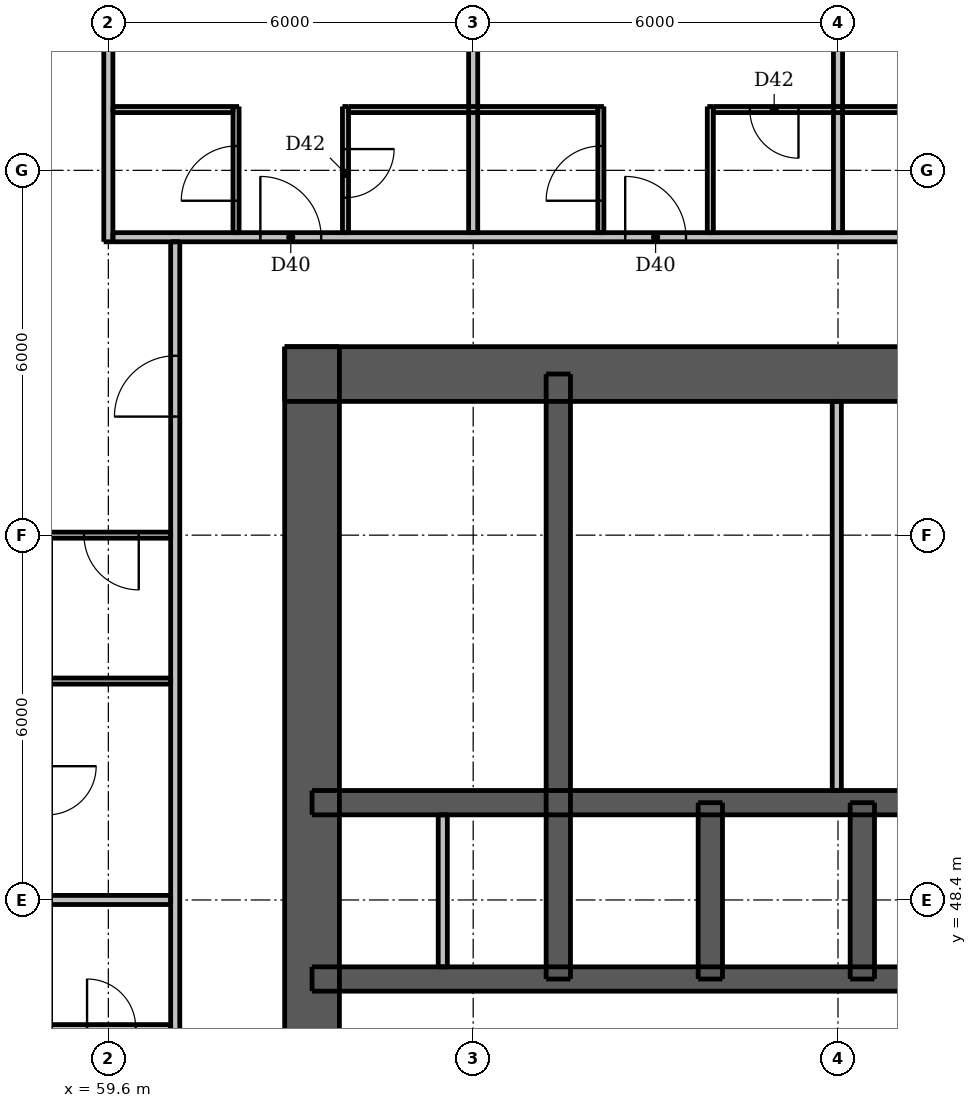
"""IFC4 building model, lengths in metres.
Left out: names, types, materials, properties, quantities, classifications, styles, units other than length and angle.
Written with IfcOpenShell. Run it as: python <this file> out.ifc"""

import sys

from ifc_helpers import new_model, si_unit, direction, frame, frame_2d, origin, place, context, subcontext, project, spatial, rectangle, extrude, element, fill, save


model = new_model("IFC4")
c1 = context("Model", 3, precision=1e-05, world=origin(), true_north=direction((0.0, 1.0)))
c2 = subcontext(c1, "Body", "Model", "MODEL_VIEW")
j1 = project(units=[si_unit("LENGTHUNIT", "METRE"), si_unit("PLANEANGLEUNIT", "RADIAN")], contexts=[c1])
p1 = place(None, origin())
s1 = spatial("IfcSite", under=j1, at=p1, CompositionType="ELEMENT")
p2 = place(p1, origin())
s2 = spatial("IfcBuilding", under=s1, at=p2, CompositionType="ELEMENT")
p3 = place(p2, frame((0.0, 0.0, 26.8)))
s3 = spatial("IfcBuildingStorey", under=s2, at=p3, CompositionType="ELEMENT", Elevation=26.8)
p4 = place(p3, frame((62.5, 57.05, 0.0), z_axis=(0.0, 0.0, 1.0), x_axis=(1.0, 0.0, 0.0)))
e1 = element("IfcWall", 1, at=p4, inside=s3, PredefinedType="SHEAR", context=c2, shape_type="SweptSolid", body=[
    extrude(rectangle(XDim=24.0, YDim=0.9, at=frame_2d((12.0, 0.0))), origin(), (0.0, 0.0, 1.0), 3.05),
])
p5 = place(p4, frame((20.85, 0.0, 0.0)))
e2 = element("IfcOpeningElement", 2, at=p5, cuts=e1, PredefinedType="OPENING", context=c2, shape_type="SweptSolid", body=[
    extrude(rectangle(XDim=1.1, YDim=2.1, at=frame_2d((0.55, 1.05))), frame((0.0, 0.46, 0.0), z_axis=(0.0, -1.0, 0.0), x_axis=(1.0, 0.0, 0.0)), (0.0, 0.0, 1.0), 0.92),
])
p6 = place(p4, frame((2.05, 0.0, 0.0)))
e3 = element("IfcOpeningElement", 3, at=p6, cuts=e1, PredefinedType="OPENING", context=c2, shape_type="SweptSolid", body=[
    extrude(rectangle(XDim=1.1, YDim=2.1, at=frame_2d((0.55, 1.05))), frame((0.0, 0.46, 0.0), z_axis=(0.0, -1.0, 0.0), x_axis=(1.0, 0.0, 0.0)), (0.0, 0.0, 1.0), 0.92),
])
p7 = place(p4, frame((6.44, 0.0, 0.0)))
e4 = element("IfcOpeningElement", 4, at=p7, cuts=e1, PredefinedType="OPENING", context=c2, shape_type="SweptSolid", body=[
    extrude(rectangle(XDim=0.9, YDim=2.1, at=frame_2d((0.45, 1.05))), frame((0.0, 0.46, 0.0), z_axis=(0.0, -1.0, 0.0), x_axis=(1.0, 0.0, 0.0)), (0.0, 0.0, 1.0), 0.92),
])
p8 = place(p4, frame((13.74, 0.0, 0.0)))
e5 = element("IfcOpeningElement", 5, at=p8, cuts=e1, PredefinedType="OPENING", context=c2, shape_type="SweptSolid", body=[
    extrude(rectangle(XDim=0.9, YDim=2.1, at=frame_2d((0.45, 1.05))), frame((0.0, 0.46, 0.0), z_axis=(0.0, -1.0, 0.0), x_axis=(1.0, 0.0, 0.0)), (0.0, 0.0, 1.0), 0.92),
])
p9 = place(p3, frame((62.95, 33.5, 0.0), z_axis=(0.0, 0.0, 1.0), x_axis=(0.0, 1.0, 0.0)))
e6 = element("IfcWall", 6, at=p9, inside=s3, PredefinedType="SHEAR", context=c2, shape_type="SweptSolid", body=[
    extrude(rectangle(XDim=24.0, YDim=0.9, at=frame_2d((12.0, 0.0))), origin(), (0.0, 0.0, 1.0), 3.05),
])
p10 = place(p9, frame((11.2, 0.0, 0.0)))
e7 = element("IfcOpeningElement", 7, at=p10, cuts=e6, PredefinedType="OPENING", context=c2, shape_type="SweptSolid", body=[
    extrude(rectangle(XDim=1.6, YDim=2.1, at=frame_2d((0.8, 1.05))), frame((0.0, 0.46, 0.0), z_axis=(0.0, -1.0, 0.0), x_axis=(1.0, 0.0, 0.0)), (0.0, 0.0, 1.0), 0.92),
])
p11 = place(p3, frame((62.95, 47.1, 0.0), z_axis=(0.0, 0.0, 1.0), x_axis=(1.0, 0.0, 0.0)))
e8 = element("IfcWall", 8, at=p11, inside=s3, PredefinedType="SHEAR", context=c2, shape_type="SweptSolid", body=[
    extrude(rectangle(XDim=23.1, YDim=0.4, at=frame_2d((11.55, 0.0))), origin(), (0.0, 0.0, 1.0), 3.05),
])
p12 = place(p11, frame((0.85, 0.0, 0.0)))
e9 = element("IfcOpeningElement", 9, at=p12, cuts=e8, PredefinedType="OPENING", context=c2, shape_type="SweptSolid", body=[
    extrude(rectangle(XDim=0.9, YDim=2.1, at=frame_2d((0.45, 1.05))), frame((0.0, 0.21, 0.0), z_axis=(0.0, -1.0, 0.0), x_axis=(1.0, 0.0, 0.0)), (0.0, 0.0, 1.0), 0.42),
])
p13 = place(p11, frame((2.55, 0.0, 0.0)))
e10 = element("IfcOpeningElement", 10, at=p13, cuts=e8, PredefinedType="OPENING", context=c2, shape_type="SweptSolid", body=[
    extrude(rectangle(XDim=0.9, YDim=2.1, at=frame_2d((0.45, 1.05))), frame((0.0, 0.21, 0.0), z_axis=(0.0, -1.0, 0.0), x_axis=(1.0, 0.0, 0.0)), (0.0, 0.0, 1.0), 0.42),
])
p14 = place(p11, frame((20.5, 0.0, 0.0)))
e11 = element("IfcOpeningElement", 11, at=p14, cuts=e8, PredefinedType="OPENING", context=c2, shape_type="SweptSolid", body=[
    extrude(rectangle(XDim=0.9, YDim=2.1, at=frame_2d((0.45, 1.05))), frame((0.0, 0.21, 0.0), z_axis=(0.0, -1.0, 0.0), x_axis=(1.0, 0.0, 0.0)), (0.0, 0.0, 1.0), 0.42),
])
p15 = place(p3, frame((62.95, 50.0, 0.0), z_axis=(0.0, 0.0, 1.0), x_axis=(1.0, 0.0, 0.0)))
e12 = element("IfcWall", 12, at=p15, inside=s3, PredefinedType="SHEAR", context=c2, shape_type="SweptSolid", body=[
    extrude(rectangle(XDim=23.1, YDim=0.4, at=frame_2d((11.55, 0.0))), origin(), (0.0, 0.0, 1.0), 3.05),
])
p16 = place(p3, frame((67.0, 47.1, 0.0), z_axis=(0.0, 0.0, 1.0), x_axis=(0.0, 1.0, 0.0)))
e13 = element("IfcWall", 13, at=p16, inside=s3, PredefinedType="SHEAR", context=c2, shape_type="SweptSolid", body=[
    extrude(rectangle(XDim=9.95, YDim=0.4, at=frame_2d((4.975, 0.0))), origin(), (0.0, 0.0, 1.0), 3.05),
])
for number, where, z_axis, x_axis in (
    (14, (69.5, 47.1, 0.0), (0.0, 0.0, 1.0), (0.0, 1.0, 0.0)),
    (15, (72.0, 47.1, 0.0), (0.0, 0.0, 1.0), (0.0, 1.0, 0.0)),
):
    element("IfcWall", number, at=place(p3, frame(where, z_axis=z_axis, x_axis=x_axis)), inside=s3, PredefinedType="SHEAR", context=c2, shape_type="SweptSolid", body=[
        extrude(rectangle(XDim=2.9, YDim=0.4, at=frame_2d((1.45, 0.0))), origin(), (0.0, 0.0, 1.0), 3.05),
    ])
p17 = place(p3, frame((65.1, 47.3, 0.0), z_axis=(0.0, 0.0, 1.0), x_axis=(0.0, 1.0, 0.0)))
e16 = element("IfcWall", 16, at=p17, inside=s3, PredefinedType="PLUMBINGWALL", context=c2, shape_type="SweptSolid", body=[
    extrude(rectangle(XDim=2.5, YDim=0.15, at=frame_2d((1.25, 0.0))), origin(), (0.0, 0.0, 1.0), 3.05),
])
p18 = place(p3, frame((71.58, 50.2, 0.0), z_axis=(0.0, 0.0, 1.0), x_axis=(0.0, 1.0, 0.0)))
e17 = element("IfcWall", 17, at=p18, inside=s3, PredefinedType="PLUMBINGWALL", context=c2, shape_type="SweptSolid", body=[
    extrude(rectangle(XDim=6.4, YDim=0.15, at=frame_2d((3.2, 0.0))), origin(), (0.0, 0.0, 1.0), 3.05),
])
p19 = place(p3, frame((61.7, 59.375, 0.0), z_axis=(0.0, 0.0, 1.0), x_axis=(0.0, 1.0, 0.0)))
e18 = element("IfcWall", 18, at=p19, inside=s3, PredefinedType="PARTITIONING", context=c2, shape_type="SweptSolid", body=[
    extrude(rectangle(XDim=2.075, YDim=0.1, at=frame_2d((1.038, 0.0))), origin(), (0.0, 0.0, 1.0), 3.05),
])
p20 = place(p19, frame((0.525, 0.0, 0.0)))
e19 = element("IfcOpeningElement", 19, at=p20, cuts=e18, PredefinedType="OPENING", context=c2, shape_type="SweptSolid", body=[
    extrude(rectangle(XDim=0.9, YDim=2.1, at=frame_2d((0.45, 1.05))), frame((0.0, 0.06, 0.0), z_axis=(0.0, -1.0, 0.0), x_axis=(1.0, 0.0, 0.0)), (0.0, 0.0, 1.0), 0.12),
])
p21 = place(p3, frame((63.5, 61.45, 0.0), z_axis=(0.0, 0.0, 1.0), x_axis=(0.0, -1.0, 0.0)))
e20 = element("IfcWall", 20, at=p21, inside=s3, PredefinedType="PARTITIONING", context=c2, shape_type="SweptSolid", body=[
    extrude(rectangle(XDim=2.075, YDim=0.1, at=frame_2d((1.038, 0.0))), origin(), (0.0, 0.0, 1.0), 3.05),
])
p22 = place(p21, frame((0.7, 0.0, 0.0)))
e21 = element("IfcOpeningElement", 21, at=p22, cuts=e20, PredefinedType="OPENING", context=c2, shape_type="SweptSolid", body=[
    extrude(rectangle(XDim=0.8, YDim=2.1, at=frame_2d((0.4, 1.05))), frame((0.0, 0.06, 0.0), z_axis=(0.0, -1.0, 0.0), x_axis=(1.0, 0.0, 0.0)), (0.0, 0.0, 1.0), 0.12),
])
p23 = place(p3, frame((67.7, 59.375, 0.0), z_axis=(0.0, 0.0, 1.0), x_axis=(0.0, 1.0, 0.0)))
e22 = element("IfcWall", 22, at=p23, inside=s3, PredefinedType="PARTITIONING", context=c2, shape_type="SweptSolid", body=[
    extrude(rectangle(XDim=2.075, YDim=0.1, at=frame_2d((1.038, 0.0))), origin(), (0.0, 0.0, 1.0), 3.05),
])
p24 = place(p23, frame((0.525, 0.0, 0.0)))
e23 = element("IfcOpeningElement", 23, at=p24, cuts=e22, PredefinedType="OPENING", context=c2, shape_type="SweptSolid", body=[
    extrude(rectangle(XDim=0.9, YDim=2.1, at=frame_2d((0.45, 1.05))), frame((0.0, 0.06, 0.0), z_axis=(0.0, -1.0, 0.0), x_axis=(1.0, 0.0, 0.0)), (0.0, 0.0, 1.0), 0.12),
])
p25 = place(p3, frame((69.5, 59.375, 0.0), z_axis=(0.0, 0.0, 1.0), x_axis=(0.0, 1.0, 0.0)))
e24 = element("IfcWall", 24, at=p25, inside=s3, PredefinedType="PARTITIONING", context=c2, shape_type="SweptSolid", body=[
    extrude(rectangle(XDim=2.075, YDim=0.1, at=frame_2d((1.038, 0.0))), origin(), (0.0, 0.0, 1.0), 3.05),
])
p26 = place(p3, frame((59.675, 61.4, 0.0), z_axis=(0.0, 0.0, 1.0), x_axis=(1.0, 0.0, 0.0)))
e25 = element("IfcWall", 25, at=p26, inside=s3, PredefinedType="PARTITIONING", context=c2, shape_type="SweptSolid", body=[
    extrude(rectangle(XDim=1.975, YDim=0.1, at=frame_2d((0.987, 0.0))), origin(), (0.0, 0.0, 1.0), 3.05),
])
p27 = place(p3, frame((63.55, 61.4, 0.0), z_axis=(0.0, 0.0, 1.0), x_axis=(1.0, 0.0, 0.0)))
e26 = element("IfcWall", 26, at=p27, inside=s3, PredefinedType="PARTITIONING", context=c2, shape_type="SweptSolid", body=[
    extrude(rectangle(XDim=4.1, YDim=0.1, at=frame_2d((2.05, 0.0))), origin(), (0.0, 0.0, 1.0), 3.05),
])
p28 = place(p3, frame((73.65, 61.4, 0.0), z_axis=(0.0, 0.0, 1.0), x_axis=(-1.0, 0.0, 0.0)))
e27 = element("IfcWall", 27, at=p28, inside=s3, PredefinedType="PARTITIONING", context=c2, shape_type="SweptSolid", body=[
    extrude(rectangle(XDim=4.1, YDim=0.1, at=frame_2d((2.05, 0.0))), origin(), (0.0, 0.0, 1.0), 3.05),
])
p29 = place(p28, frame((2.7, 0.0, 0.0)))
e28 = element("IfcOpeningElement", 28, at=p29, cuts=e27, PredefinedType="OPENING", context=c2, shape_type="SweptSolid", body=[
    extrude(rectangle(XDim=0.8, YDim=2.1, at=frame_2d((0.4, 1.05))), frame((0.0, 0.06, 0.0), z_axis=(0.0, -1.0, 0.0), x_axis=(1.0, 0.0, 0.0)), (0.0, 0.0, 1.0), 0.12),
])
p30 = place(p3, frame((60.625, 54.4, 0.0), z_axis=(0.0, 0.0, 1.0), x_axis=(-1.0, 0.0, 0.0)))
e29 = element("IfcWall", 29, at=p30, inside=s3, PredefinedType="PARTITIONING", context=c2, shape_type="SweptSolid", body=[
    extrude(rectangle(XDim=8.625, YDim=0.1, at=frame_2d((4.312, 0.0))), origin(), (0.0, 0.0, 1.0), 2.516),
])
p31 = place(p30, frame((0.525, 0.0, 0.0)))
e30 = element("IfcOpeningElement", 30, at=p31, cuts=e29, PredefinedType="OPENING", context=c2, shape_type="SweptSolid", body=[
    extrude(rectangle(XDim=0.9, YDim=2.1, at=frame_2d((0.45, 1.05))), frame((0.0, 0.06, 0.0), z_axis=(0.0, -1.0, 0.0), x_axis=(1.0, 0.0, 0.0)), (0.0, 0.0, 1.0), 0.12),
])
p32 = place(p30, frame((4.875, 0.0, 0.0)))
e31 = element("IfcOpeningElement", 31, at=p32, cuts=e29, PredefinedType="OPENING", context=c2, shape_type="SweptSolid", body=[
    extrude(rectangle(XDim=0.9, YDim=2.1, at=frame_2d((0.45, 1.05))), frame((0.0, 0.06, 0.0), z_axis=(0.0, -1.0, 0.0), x_axis=(1.0, 0.0, 0.0)), (0.0, 0.0, 1.0), 0.12),
])
p33 = place(p3, frame((58.65, 52.0, 0.0), z_axis=(0.0, 0.0, 1.0), x_axis=(1.0, 0.0, 0.0)))
e32 = element("IfcWall", 32, at=p33, inside=s3, PredefinedType="PARTITIONING", context=c2, shape_type="SweptSolid", body=[
    extrude(rectangle(XDim=1.975, YDim=0.1, at=frame_2d((0.988, 0.0))), origin(), (0.0, 0.0, 1.0), 3.05),
])
p34 = place(p3, frame((58.65, 46.3, 0.0), z_axis=(0.0, 0.0, 1.0), x_axis=(1.0, 0.0, 0.0)))
e33 = element("IfcWall", 33, at=p34, inside=s3, PredefinedType="PARTITIONING", context=c2, shape_type="SweptSolid", body=[
    extrude(rectangle(XDim=1.975, YDim=0.1, at=frame_2d((0.988, 0.0))), origin(), (0.0, 0.0, 1.0), 3.05),
])
p35 = place(p34, frame((0.6, 0.0, 0.0)))
e34 = element("IfcOpeningElement", 34, at=p35, cuts=e33, PredefinedType="OPENING", context=c2, shape_type="SweptSolid", body=[
    extrude(rectangle(XDim=0.8, YDim=2.1, at=frame_2d((0.4, 1.05))), frame((0.0, 0.06, 0.0), z_axis=(0.0, -1.0, 0.0), x_axis=(1.0, 0.0, 0.0)), (0.0, 0.0, 1.0), 0.12),
])
p36 = place(p3, frame((59.6, 59.225, 0.0), z_axis=(0.0, 0.0, 1.0), x_axis=(0.0, 1.0, 0.0)))
e35 = element("IfcWall", 35, at=p36, inside=s3, PredefinedType="PARTITIONING", context=c2, shape_type="SweptSolid", body=[
    extrude(rectangle(XDim=8.775, YDim=0.15, at=frame_2d((4.387, 0.0))), origin(), (0.0, 0.0, 1.0), 2.51),
])
p37 = place(p3, frame((60.7, 30.325, 0.0), z_axis=(0.0, 0.0, 1.0), x_axis=(0.0, 1.0, 0.0)))
e36 = element("IfcWall", 36, at=p37, inside=s3, PredefinedType="PARTITIONING", context=c2, shape_type="SweptSolid", body=[
    extrude(rectangle(XDim=28.9, YDim=0.15, at=frame_2d((14.45, 0.0))), origin(), (0.0, 0.0, 1.0), 3.05),
])
p38 = place(p37, frame((2.575, 0.0, 0.0)))
e37 = element("IfcOpeningElement", 37, at=p38, cuts=e36, PredefinedType="OPENING", context=c2, shape_type="SweptSolid", body=[
    extrude(rectangle(XDim=1.0, YDim=2.1, at=frame_2d((0.5, 1.05))), frame((0.0, 0.085, 0.0), z_axis=(0.0, -1.0, 0.0), x_axis=(1.0, 0.0, 0.0)), (0.0, 0.0, 1.0), 0.17),
])
p39 = place(p37, frame((8.575, 0.0, 0.0)))
e38 = element("IfcOpeningElement", 38, at=p39, cuts=e36, PredefinedType="OPENING", context=c2, shape_type="SweptSolid", body=[
    extrude(rectangle(XDim=1.0, YDim=2.1, at=frame_2d((0.5, 1.05))), frame((0.0, 0.085, 0.0), z_axis=(0.0, -1.0, 0.0), x_axis=(1.0, 0.0, 0.0)), (0.0, 0.0, 1.0), 0.17),
])
p40 = place(p37, frame((14.575, 0.0, 0.0)))
e39 = element("IfcOpeningElement", 39, at=p40, cuts=e36, PredefinedType="OPENING", context=c2, shape_type="SweptSolid", body=[
    extrude(rectangle(XDim=1.0, YDim=2.1, at=frame_2d((0.5, 1.05))), frame((0.0, 0.085, 0.0), z_axis=(0.0, -1.0, 0.0), x_axis=(1.0, 0.0, 0.0)), (0.0, 0.0, 1.0), 0.17),
])
p41 = place(p37, frame((26.025, 0.0, 0.0)))
e40 = element("IfcOpeningElement", 40, at=p41, cuts=e36, PredefinedType="OPENING", context=c2, shape_type="SweptSolid", body=[
    extrude(rectangle(XDim=1.0, YDim=2.1, at=frame_2d((0.5, 1.05))), frame((0.0, 0.085, 0.0), z_axis=(0.0, -1.0, 0.0), x_axis=(1.0, 0.0, 0.0)), (0.0, 0.0, 1.0), 0.17),
])
for number, where, z_axis, x_axis in (
    (41, (65.6, 59.375, 0.0), (0.0, 0.0, 1.0), (0.0, 1.0, 0.0)),
    (42, (71.6, 59.375, 0.0), (0.0, 0.0, 1.0), (0.0, 1.0, 0.0)),
):
    element("IfcWall", number, at=place(p3, frame(where, z_axis=z_axis, x_axis=x_axis)), inside=s3, PredefinedType="PARTITIONING", context=c2, shape_type="SweptSolid", body=[
        extrude(rectangle(XDim=8.625, YDim=0.15, at=frame_2d((4.312, 0.0))), origin(), (0.0, 0.0, 1.0), 2.516),
    ])
p42 = place(p3, frame((59.675, 59.3, 0.0), z_axis=(0.0, 0.0, 1.0), x_axis=(1.0, 0.0, 0.0)))
e43 = element("IfcWall", 43, at=p42, inside=s3, PredefinedType="PARTITIONING", context=c2, shape_type="SweptSolid", body=[
    extrude(rectangle(XDim=28.55, YDim=0.15, at=frame_2d((14.275, 0.0))), origin(), (0.0, 0.0, 1.0), 3.05),
])
p43 = place(p42, frame((2.425, 0.0, 0.0)))
e44 = element("IfcOpeningElement", 44, at=p43, cuts=e43, PredefinedType="OPENING", context=c2, shape_type="SweptSolid", body=[
    extrude(rectangle(XDim=1.0, YDim=2.1, at=frame_2d((0.5, 1.05))), frame((0.0, 0.085, 0.0), z_axis=(0.0, -1.0, 0.0), x_axis=(1.0, 0.0, 0.0)), (0.0, 0.0, 1.0), 0.17),
])
p44 = place(p42, frame((8.425, 0.0, 0.0)))
e45 = element("IfcOpeningElement", 45, at=p44, cuts=e43, PredefinedType="OPENING", context=c2, shape_type="SweptSolid", body=[
    extrude(rectangle(XDim=1.0, YDim=2.1, at=frame_2d((0.5, 1.05))), frame((0.0, 0.085, 0.0), z_axis=(0.0, -1.0, 0.0), x_axis=(1.0, 0.0, 0.0)), (0.0, 0.0, 1.0), 0.17),
])
p45 = place(p42, frame((14.425, 0.0, 0.0)))
e46 = element("IfcOpeningElement", 46, at=p45, cuts=e43, PredefinedType="OPENING", context=c2, shape_type="SweptSolid", body=[
    extrude(rectangle(XDim=1.0, YDim=2.1, at=frame_2d((0.5, 1.05))), frame((0.0, 0.085, 0.0), z_axis=(0.0, -1.0, 0.0), x_axis=(1.0, 0.0, 0.0)), (0.0, 0.0, 1.0), 0.17),
])
p46 = place(p42, frame((25.775, 0.0, 0.0)))
e47 = element("IfcOpeningElement", 47, at=p46, cuts=e43, PredefinedType="OPENING", context=c2, shape_type="SweptSolid", body=[
    extrude(rectangle(XDim=1.0, YDim=2.1, at=frame_2d((0.5, 1.05))), frame((0.0, 0.085, 0.0), z_axis=(0.0, -1.0, 0.0), x_axis=(1.0, 0.0, 0.0)), (0.0, 0.0, 1.0), 0.17),
])
p47 = place(p3, frame((52.0, 48.4, 0.0), z_axis=(0.0, 0.0, 1.0), x_axis=(1.0, 0.0, 0.0)))
e48 = element("IfcWall", 48, at=p47, inside=s3, PredefinedType="PARTITIONING", context=c2, shape_type="SweptSolid", body=[
    extrude(rectangle(XDim=8.625, YDim=0.15, at=frame_2d((4.312, 0.0))), origin(), (0.0, 0.0, 1.0), 2.516),
])
p48 = place(p6, origin())
e49 = element("IfcDoor", 49, at=p48, inside=s3, OperationType="SINGLE_SWING_LEFT", PredefinedType="DOOR", context=c2, shape_type="SweptSolid", body=[
    extrude(rectangle(XDim=1.1, YDim=2.1, at=frame_2d((0.55, 1.05))), frame((0.0, -0.388, 0.0), z_axis=(0.0, -1.0, 0.0), x_axis=(1.0, 0.0, 0.0)), (0.0, 0.0, 1.0), 0.05),
])
fill(e3, e49)
p49 = place(p12, origin())
e50 = element("IfcDoor", 50, at=p49, inside=s3, OperationType="SINGLE_SWING_LEFT", PredefinedType="DOOR", context=c2, shape_type="SweptSolid", body=[
    extrude(rectangle(XDim=0.9, YDim=2.1, at=frame_2d((0.45, 1.05))), frame((0.0, 0.188, 0.0), z_axis=(0.0, -1.0, 0.0), x_axis=(1.0, 0.0, 0.0)), (0.0, 0.0, 1.0), 0.05),
])
fill(e9, e50)
p50 = place(p13, origin())
e51 = element("IfcDoor", 51, at=p50, inside=s3, OperationType="SINGLE_SWING_RIGHT", PredefinedType="DOOR", context=c2, shape_type="SweptSolid", body=[
    extrude(rectangle(XDim=0.9, YDim=2.1, at=frame_2d((0.45, 1.05))), frame((0.0, 0.188, 0.0), z_axis=(0.0, -1.0, 0.0), x_axis=(1.0, 0.0, 0.0)), (0.0, 0.0, 1.0), 0.05),
])
fill(e10, e51)
p51 = place(p7, origin())
e52 = element("IfcDoor", 52, at=p51, inside=s3, OperationType="SINGLE_SWING_RIGHT", PredefinedType="DOOR", context=c2, shape_type="SweptSolid", body=[
    extrude(rectangle(XDim=0.9, YDim=2.1, at=frame_2d((0.45, 1.05))), frame((0.0, -0.388, 0.0), z_axis=(0.0, -1.0, 0.0), x_axis=(1.0, 0.0, 0.0)), (0.0, 0.0, 1.0), 0.05),
])
fill(e4, e52)
p52 = place(p43, origin())
e53 = element("IfcDoor", 53, at=p52, inside=s3, OperationType="SINGLE_SWING_LEFT", PredefinedType="DOOR", context=c2, shape_type="SweptSolid", body=[
    extrude(rectangle(XDim=1.0, YDim=2.1, at=frame_2d((0.5, 1.05))), frame((0.0, 0.025, 0.0), z_axis=(0.0, -1.0, 0.0), x_axis=(1.0, 0.0, 0.0)), (0.0, 0.0, 1.0), 0.05),
])
fill(e44, e53)
p53 = place(p20, origin())
e54 = element("IfcDoor", 54, at=p53, inside=s3, OperationType="SINGLE_SWING_LEFT", PredefinedType="DOOR", context=c2, shape_type="SweptSolid", body=[
    extrude(rectangle(XDim=0.9, YDim=2.1, at=frame_2d((0.45, 1.05))), frame((0.0, 0.025, 0.0), z_axis=(0.0, -1.0, 0.0), x_axis=(1.0, 0.0, 0.0)), (0.0, 0.0, 1.0), 0.05),
])
fill(e19, e54)
p54 = place(p22, origin())
e55 = element("IfcDoor", 55, at=p54, inside=s3, OperationType="SINGLE_SWING_LEFT", PredefinedType="DOOR", context=c2, shape_type="SweptSolid", body=[
    extrude(rectangle(XDim=0.8, YDim=2.1, at=frame_2d((0.4, 1.05))), frame((0.0, 0.025, 0.0), z_axis=(0.0, -1.0, 0.0), x_axis=(1.0, 0.0, 0.0)), (0.0, 0.0, 1.0), 0.05),
])
fill(e21, e55)
p55 = place(p44, origin())
e56 = element("IfcDoor", 56, at=p55, inside=s3, OperationType="SINGLE_SWING_LEFT", PredefinedType="DOOR", context=c2, shape_type="SweptSolid", body=[
    extrude(rectangle(XDim=1.0, YDim=2.1, at=frame_2d((0.5, 1.05))), frame((0.0, 0.025, 0.0), z_axis=(0.0, -1.0, 0.0), x_axis=(1.0, 0.0, 0.0)), (0.0, 0.0, 1.0), 0.05),
])
fill(e45, e56)
p56 = place(p24, origin())
e57 = element("IfcDoor", 57, at=p56, inside=s3, OperationType="SINGLE_SWING_LEFT", PredefinedType="DOOR", context=c2, shape_type="SweptSolid", body=[
    extrude(rectangle(XDim=0.9, YDim=2.1, at=frame_2d((0.45, 1.05))), frame((0.0, 0.025, 0.0), z_axis=(0.0, -1.0, 0.0), x_axis=(1.0, 0.0, 0.0)), (0.0, 0.0, 1.0), 0.05),
])
fill(e23, e57)
p57 = place(p29, origin())
e58 = element("IfcDoor", 58, at=p57, inside=s3, OperationType="SINGLE_SWING_LEFT", PredefinedType="DOOR", context=c2, shape_type="SweptSolid", body=[
    extrude(rectangle(XDim=0.8, YDim=2.1, at=frame_2d((0.4, 1.05))), frame((0.0, 0.025, 0.0), z_axis=(0.0, -1.0, 0.0), x_axis=(1.0, 0.0, 0.0)), (0.0, 0.0, 1.0), 0.05),
])
fill(e28, e58)
p58 = place(p35, origin())
e59 = element("IfcDoor", 59, at=p58, inside=s3, OperationType="SINGLE_SWING_LEFT", PredefinedType="DOOR", context=c2, shape_type="SweptSolid", body=[
    extrude(rectangle(XDim=0.8, YDim=2.1, at=frame_2d((0.4, 1.05))), frame((0.0, 0.025, 0.0), z_axis=(0.0, -1.0, 0.0), x_axis=(1.0, 0.0, 0.0)), (0.0, 0.0, 1.0), 0.05),
])
fill(e34, e59)
p59 = place(p41, origin())
e60 = element("IfcDoor", 60, at=p59, inside=s3, OperationType="SINGLE_SWING_LEFT", PredefinedType="DOOR", context=c2, shape_type="SweptSolid", body=[
    extrude(rectangle(XDim=1.0, YDim=2.1, at=frame_2d((0.5, 1.05))), frame((0.0, 0.025, 0.0), z_axis=(0.0, -1.0, 0.0), x_axis=(1.0, 0.0, 0.0)), (0.0, 0.0, 1.0), 0.05),
])
fill(e40, e60)
p60 = place(p31, origin())
e61 = element("IfcDoor", 61, at=p60, inside=s3, OperationType="SINGLE_SWING_LEFT", PredefinedType="DOOR", context=c2, shape_type="SweptSolid", body=[
    extrude(rectangle(XDim=0.9, YDim=2.1, at=frame_2d((0.45, 1.05))), frame((0.0, 0.025, 0.0), z_axis=(0.0, -1.0, 0.0), x_axis=(1.0, 0.0, 0.0)), (0.0, 0.0, 1.0), 0.05),
])
fill(e30, e61)
save(model, sys.argv[1])
